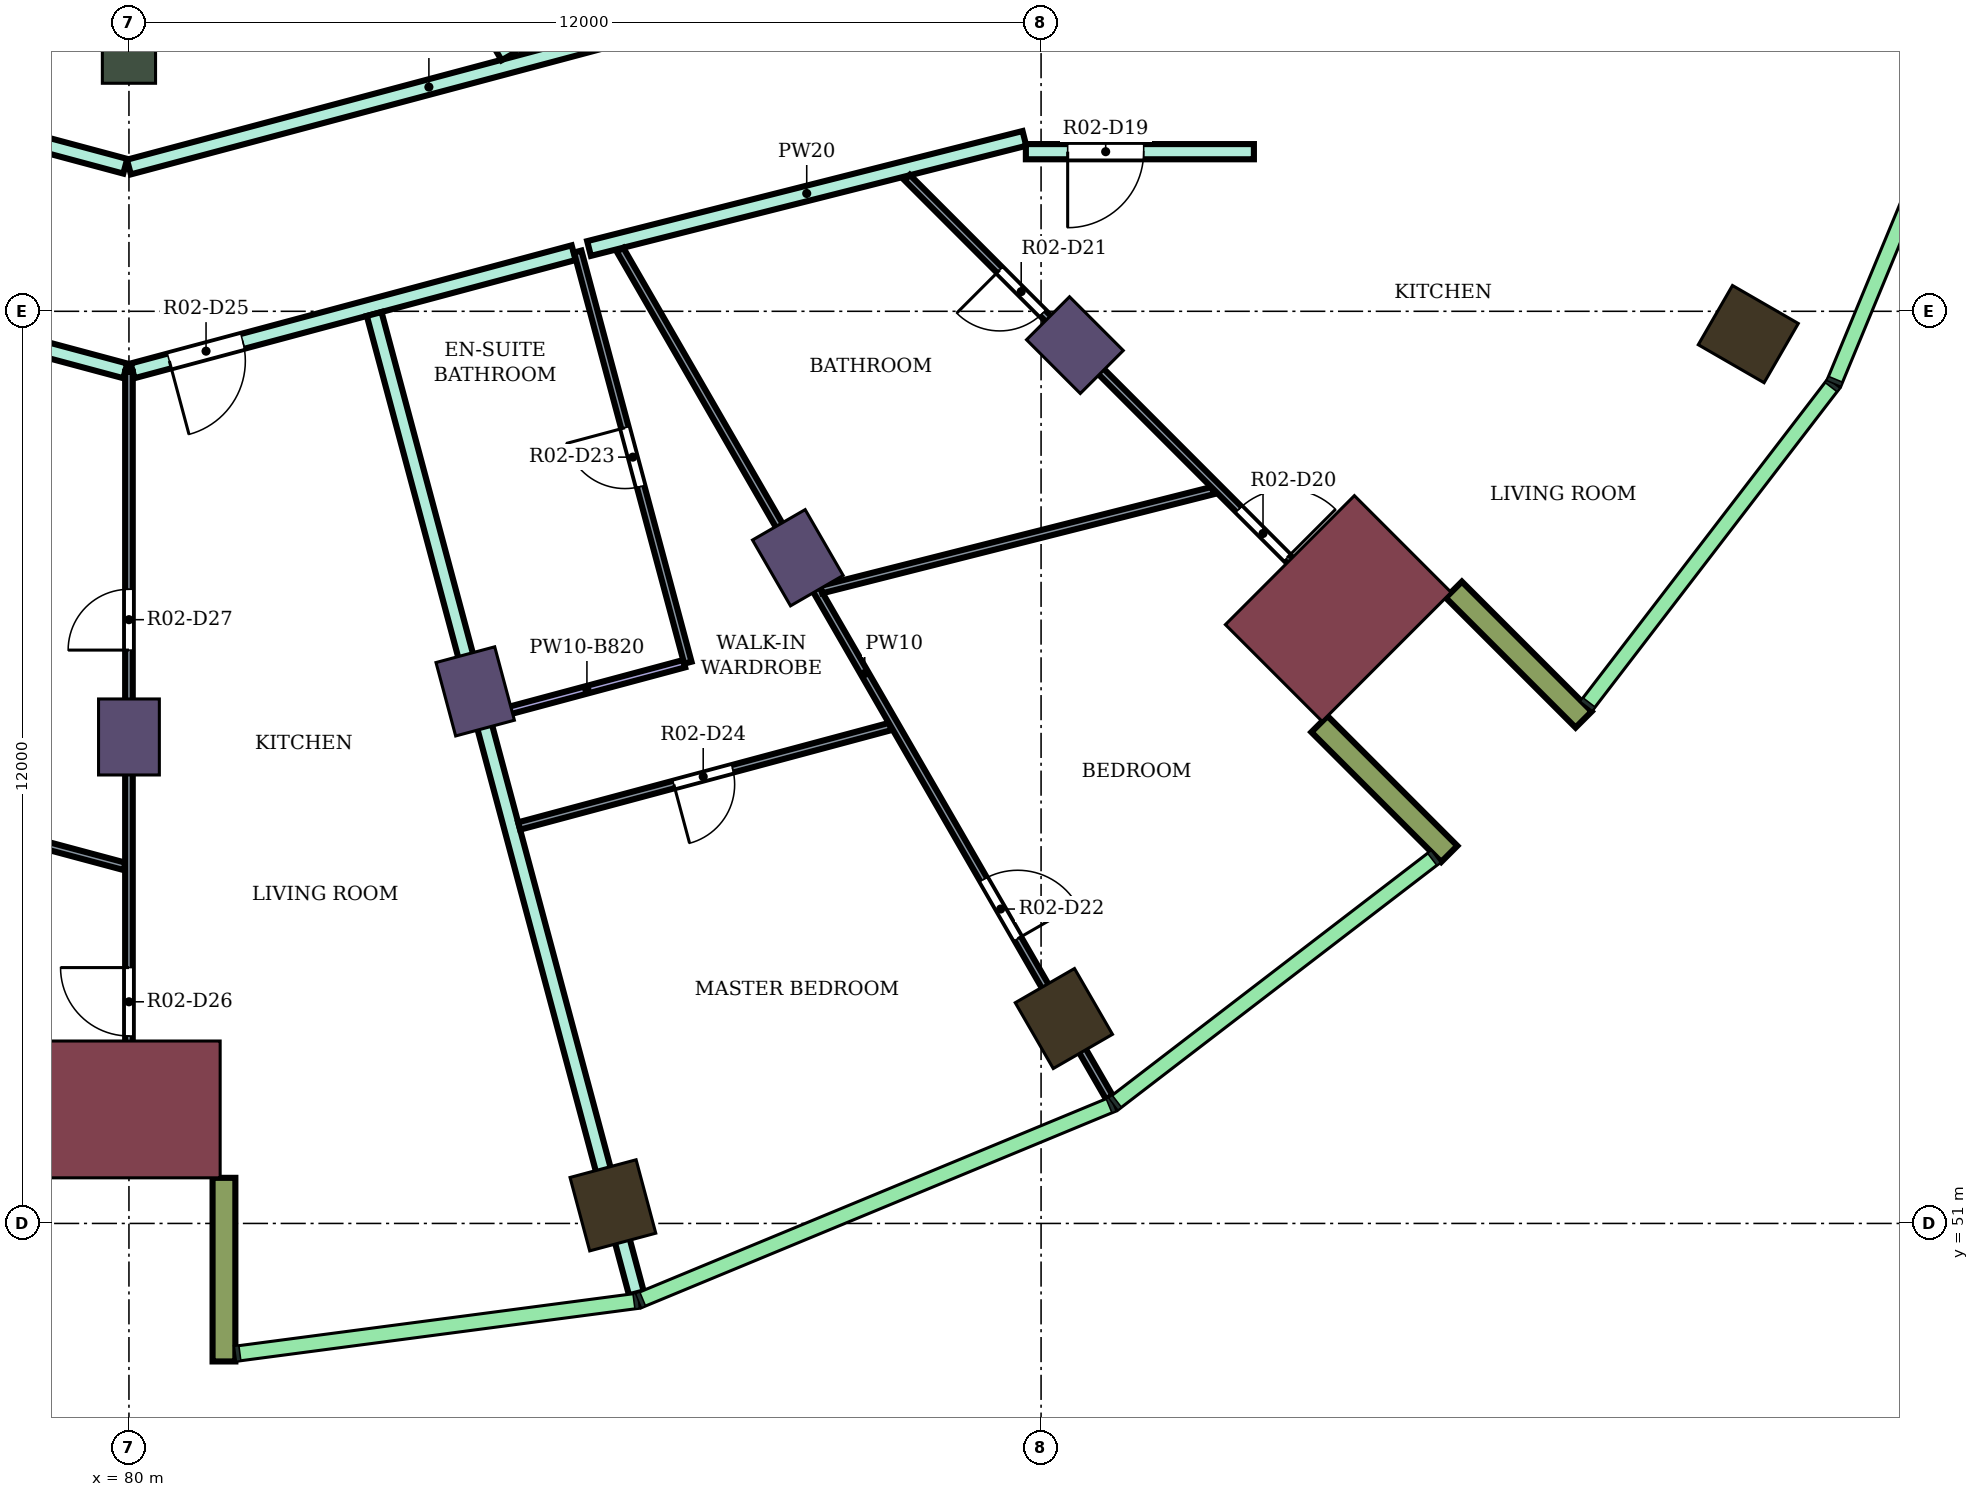
"""IFC4 building model, lengths in metres.
Left out: names, types, materials, properties, quantities, classifications, styles, units other than length and angle.
Written with IfcOpenShell. Run it as: python <this file> out.ifc"""

import sys

from ifc_helpers import new_model, si_unit, direction, frame, frame_2d, origin, origin_2d, place, context, subcontext, project, spatial, rectangle, extrude, element, fill, save


model = new_model("IFC4")
c1 = context("Model", 3, precision=1e-05, world=origin(), true_north=direction((0.0, 1.0)))
c2 = subcontext(c1, "Body", "Model", "MODEL_VIEW")
j1 = project(units=[si_unit("LENGTHUNIT", "METRE"), si_unit("PLANEANGLEUNIT", "RADIAN")], contexts=[c1])
p1 = place(None, origin())
s1 = spatial("IfcSite", under=j1, at=p1, CompositionType="ELEMENT")
p2 = place(p1, origin())
s2 = spatial("IfcBuilding", under=s1, at=p2, CompositionType="ELEMENT")
p3 = place(p2, frame((0.0, 0.0, 178.2)))
s3 = spatial("IfcBuildingStorey", under=s2, at=p3, CompositionType="ELEMENT", Elevation=178.2)
for number, where, z_axis, x_axis in (
    (1, (86.367, 51.238, 0.0), (0.0, 0.0, 1.0), (0.259, -0.966, 0.0)),
    (2, (92.3, 53.696, 0.0), (0.0, 0.0, 1.0), (0.5, -0.866, 0.0)),
    (3, (101.304, 62.7, 0.0), (0.0, 0.0, 1.0), (0.866, -0.5, 0.0)),
):
    element("IfcColumn", number, at=place(p3, frame(where, z_axis=z_axis, x_axis=x_axis)), inside=s3, PredefinedType="COLUMN", context=c2, shape_type="SweptSolid", body=[
        extrude(rectangle(XDim=1.0, YDim=0.9, at=origin_2d()), origin(), (0.0, 0.0, 1.0), 4.1),
    ])
for number, where, z_axis, x_axis in (
    (4, (80.0, 57.4, 0.0), (0.0, 0.0, 1.0), (0.0, -1.0, 0.0)),
    (5, (84.555, 58.0, 0.0), (0.0, 0.0, 1.0), (0.259, -0.966, 0.0)),
    (6, (88.8, 59.758, 0.0), (0.0, 0.0, 1.0), (0.5, -0.866, 0.0)),
    (7, (92.445, 62.555, 0.0), (0.0, 0.0, 1.0), (0.707, -0.707, 0.0)),
):
    element("IfcColumn", number, at=place(p3, frame(where, z_axis=z_axis, x_axis=x_axis)), inside=s3, PredefinedType="COLUMN", context=c2, shape_type="SweptSolid", body=[
        extrude(rectangle(XDim=1.0, YDim=0.8, at=origin_2d()), origin(), (0.0, 0.0, 1.0), 4.1),
    ])
p4 = place(p3, frame((80.0, 66.4, 0.0), z_axis=(0.0, 0.0, 1.0), x_axis=(0.0, -1.0, 0.0)))
e8 = element("IfcColumn", 8, at=p4, inside=s3, PredefinedType="COLUMN", context=c2, shape_type="SweptSolid", body=[
    extrude(rectangle(XDim=0.8, YDim=0.7, at=origin_2d()), origin(), (0.0, 0.0, 1.0), 4.1),
])
for number, where, z_axis, x_axis in (
    (9, (80.0, 52.5, 0.0), (0.0, 0.0, 1.0), (0.0, -1.0, 0.0)),
    (10, (95.91, 59.09, 0.0), (0.0, 0.0, 1.0), (0.707, -0.707, 0.0)),
):
    element("IfcColumn", number, at=place(p3, frame(where, z_axis=z_axis, x_axis=x_axis)), inside=s3, PredefinedType="COLUMN", context=c2, shape_type="SweptSolid", body=[
        extrude(rectangle(XDim=1.8, YDim=2.4, at=origin_2d()), origin(), (0.0, 0.0, 1.0), 4.1),
    ])
for number, where, z_axis, x_axis in (
    (11, (81.25, 51.6, 0.0), (0.0, 0.0, 1.0), (0.0, -1.0, 0.0)),
    (12, (95.662, 57.57, 0.0), (0.0, 0.0, 1.0), (0.707, -0.707, 0.0)),
    (13, (97.43, 59.338, 0.0), (0.0, 0.0, 1.0), (0.707, -0.707, 0.0)),
):
    element("IfcWall", number, at=place(p3, frame(where, z_axis=z_axis, x_axis=x_axis)), inside=s3, PredefinedType="NOTDEFINED", context=c2, shape_type="SweptSolid", body=[
        extrude(rectangle(XDim=2.416, YDim=0.3, at=frame_2d((1.208, 0.0))), origin(), (0.0, 0.0, 1.0), 4.1),
    ])
p5 = place(p3, frame((73.947, 63.826, 0.0), z_axis=(0.0, 0.0, 1.0), x_axis=(0.965908253407, -0.258884619088, 0.0)))
e14 = element("IfcWall", 14, at=p5, inside=s3, PredefinedType="PARTITIONING", context=c2, shape_type="SweptSolid", body=[
    extrude(rectangle(XDim=6.217, YDim=0.2, at=frame_2d((3.108, 0.0))), origin(), (0.0, 0.0, 1.0), 3.65),
])
p6 = place(p5, frame((1.424, 0.0, 0.0)))
e15 = element("IfcOpeningElement", 15, at=p6, cuts=e14, PredefinedType="OPENING", context=c2, shape_type="SweptSolid", body=[
    extrude(rectangle(XDim=1.0, YDim=2.1, at=frame_2d((0.5, 1.05))), frame((0.0, 0.11, 0.0), z_axis=(0.0, -1.0, 0.0), x_axis=(1.0, 0.0, 0.0)), (0.0, 0.0, 1.0), 0.22),
])
p7 = place(p3, frame((74.603, 66.342, 0.0), z_axis=(0.0, 0.0, 1.0), x_axis=(0.965895298152, -0.258932950796, 0.0)))
e16 = element("IfcWall", 16, at=p7, inside=s3, PredefinedType="PARTITIONING", context=c2, shape_type="SweptSolid", body=[
    extrude(rectangle(XDim=5.538, YDim=0.2, at=frame_2d((2.769, 0.0))), origin(), (0.0, 0.0, 1.0), 3.65),
])
p8 = place(p7, frame((2.062, 0.0, 0.0)))
e17 = element("IfcOpeningElement", 17, at=p8, cuts=e16, PredefinedType="OPENING", context=c2, shape_type="SweptSolid", body=[
    extrude(rectangle(XDim=1.8, YDim=2.1, at=frame_2d((0.9, 1.05))), frame((0.0, 0.11, 0.0), z_axis=(0.0, -1.0, 0.0), x_axis=(1.0, 0.0, 0.0)), (0.0, 0.0, 1.0), 0.22),
])
p9 = place(p3, frame((80.0, 64.898, 0.0), z_axis=(0.0, 0.0, 1.0), x_axis=(0.966237419782, 0.257653349704, 0.0)))
e18 = element("IfcWall", 18, at=p9, inside=s3, PredefinedType="PARTITIONING", context=c2, shape_type="SweptSolid", body=[
    extrude(rectangle(XDim=8.169, YDim=0.2, at=frame_2d((4.084, 0.0))), origin(), (0.0, 0.0, 1.0), 3.65),
])
p10 = place(p9, frame((6.428, 0.0, 0.0)))
e19 = element("IfcOpeningElement", 19, at=p10, cuts=e18, PredefinedType="OPENING", context=c2, shape_type="SweptSolid", body=[
    extrude(rectangle(XDim=0.9, YDim=2.1, at=frame_2d((0.45, 1.05))), frame((0.0, 0.11, 0.0), z_axis=(0.0, -1.0, 0.0), x_axis=(1.0, 0.0, 0.0)), (0.0, 0.0, 1.0), 0.22),
])
p11 = place(p3, frame((80.048, 62.217, 0.0), z_axis=(0.0, 0.0, 1.0), x_axis=(0.965941520544, 0.258760466242, 0.0)))
e20 = element("IfcWall", 20, at=p11, inside=s3, PredefinedType="PARTITIONING", context=c2, shape_type="SweptSolid", body=[
    extrude(rectangle(XDim=6.006, YDim=0.2, at=frame_2d((3.003, 0.0))), origin(), (0.0, 0.0, 1.0), 3.65),
])
p12 = place(p11, frame((0.5, 0.0, 0.0)))
e21 = element("IfcOpeningElement", 21, at=p12, cuts=e20, PredefinedType="OPENING", context=c2, shape_type="SweptSolid", body=[
    extrude(rectangle(XDim=1.0, YDim=2.1, at=frame_2d((0.5, 1.05))), frame((0.0, 0.11, 0.0), z_axis=(0.0, -1.0, 0.0), x_axis=(1.0, 0.0, 0.0)), (0.0, 0.0, 1.0), 0.22),
])
p13 = place(p3, frame((83.226, 62.965, 0.0), z_axis=(0.0, 0.0, 1.0), x_axis=(0.258657094602, -0.965969206244, 0.0)))
e22 = element("IfcWall", 22, at=p13, inside=s3, PredefinedType="PARTITIONING", context=c2, shape_type="SweptSolid", body=[
    extrude(rectangle(XDim=13.338, YDim=0.2, at=frame_2d((6.669, 0.0))), origin(), (0.0, 0.0, 1.0), 3.65),
])
p14 = place(p3, frame((83.847, 68.331, 0.0), z_axis=(0.0, 0.0, 1.0), x_axis=(0.499851978358, -0.866110847255, 0.0)))
e23 = element("IfcWall", 23, at=p14, inside=s3, PredefinedType="PARTITIONING", context=c2, shape_type="SweptSolid", body=[
    extrude(rectangle(XDim=2.284, YDim=0.2, at=frame_2d((1.142, 0.0))), origin(), (0.0, 0.0, 1.0), 3.65),
])
p15 = place(p3, frame((86.053, 63.826, 0.0), z_axis=(0.0, 0.0, 1.0), x_axis=(0.969490004987, 0.245130843083, 0.0)))
e24 = element("IfcWall", 24, at=p15, inside=s3, PredefinedType="PARTITIONING", context=c2, shape_type="SweptSolid", body=[
    extrude(rectangle(XDim=5.908, YDim=0.2, at=frame_2d((2.954, 0.0))), origin(), (0.0, 0.0, 1.0), 3.65),
])
p16 = place(p3, frame((91.8, 65.1, 0.0), z_axis=(0.0, 0.0, 1.0), x_axis=(1.0, 0.0, 0.0)))
e25 = element("IfcWall", 25, at=p16, inside=s3, PredefinedType="PARTITIONING", context=c2, shape_type="SweptSolid", body=[
    extrude(rectangle(XDim=3.0, YDim=0.2, at=frame_2d((1.5, 0.0))), origin(), (0.0, 0.0, 1.0), 3.65),
])
p17 = place(p16, frame((0.55, 0.0, 0.0)))
e26 = element("IfcOpeningElement", 26, at=p17, cuts=e25, PredefinedType="OPENING", context=c2, shape_type="SweptSolid", body=[
    extrude(rectangle(XDim=1.0, YDim=2.1, at=frame_2d((0.5, 1.05))), frame((0.0, 0.11, 0.0), z_axis=(0.0, -1.0, 0.0), x_axis=(1.0, 0.0, 0.0)), (0.0, 0.0, 1.0), 0.22),
])
p18 = place(p3, frame((75.267, 56.95, 0.0), z_axis=(0.0, 0.0, 1.0), x_axis=(0.965934541962, -0.258786515577, 0.0)))
e27 = element("IfcWall", 27, at=p18, inside=s3, PredefinedType="PARTITIONING", context=c2, shape_type="SweptSolid", body=[
    extrude(rectangle(XDim=4.84, YDim=0.1, at=frame_2d((2.42, 0.0))), origin(), (0.0, 0.0, 1.0), 3.65),
])
p19 = place(p3, frame((80.0, 51.8, 0.0), z_axis=(0.0, 0.0, 1.0), x_axis=(0.0, 1.0, 0.0)))
e28 = element("IfcWall", 28, at=p19, inside=s3, PredefinedType="PARTITIONING", context=c2, shape_type="SweptSolid", body=[
    extrude(rectangle(XDim=10.404, YDim=0.1, at=frame_2d((5.202, 0.0))), origin(), (0.0, 0.0, 1.0), 3.65),
])
p20 = place(p19, frame((1.666, 0.0, 0.0)))
e29 = element("IfcOpeningElement", 29, at=p20, cuts=e28, PredefinedType="OPENING", context=c2, shape_type="SweptSolid", body=[
    extrude(rectangle(XDim=0.9, YDim=2.1, at=frame_2d((0.45, 1.05))), frame((0.0, 0.06, 0.0), z_axis=(0.0, -1.0, 0.0), x_axis=(1.0, 0.0, 0.0)), (0.0, 0.0, 1.0), 0.12),
])
p21 = place(p19, frame((6.743, 0.0, 0.0)))
e30 = element("IfcOpeningElement", 30, at=p21, cuts=e28, PredefinedType="OPENING", context=c2, shape_type="SweptSolid", body=[
    extrude(rectangle(XDim=0.8, YDim=2.1, at=frame_2d((0.4, 1.05))), frame((0.0, 0.06, 0.0), z_axis=(0.0, -1.0, 0.0), x_axis=(1.0, 0.0, 0.0)), (0.0, 0.0, 1.0), 0.12),
])
p22 = place(p3, frame((84.746, 57.678, 0.0), z_axis=(0.0, 0.0, 1.0), x_axis=(0.965894568086, 0.258935674139, 0.0)))
e31 = element("IfcWall", 31, at=p22, inside=s3, PredefinedType="PARTITIONING", context=c2, shape_type="SweptSolid", body=[
    extrude(rectangle(XDim=2.649, YDim=0.1, at=frame_2d((1.325, 0.0))), origin(), (0.0, 0.0, 1.0), 3.28),
])
p23 = place(p3, frame((85.134, 56.229, 0.0), z_axis=(0.0, 0.0, 1.0), x_axis=(0.965894130068, 0.258937308051, 0.0)))
e32 = element("IfcWall", 32, at=p23, inside=s3, PredefinedType="PARTITIONING", context=c2, shape_type="SweptSolid", body=[
    extrude(rectangle(XDim=5.054, YDim=0.1, at=frame_2d((2.527, 0.0))), origin(), (0.0, 0.0, 1.0), 3.65),
])
p24 = place(p23, frame((2.107, 0.0, 0.0)))
e33 = element("IfcOpeningElement", 33, at=p24, cuts=e32, PredefinedType="OPENING", context=c2, shape_type="SweptSolid", body=[
    extrude(rectangle(XDim=0.8, YDim=2.1, at=frame_2d((0.4, 1.05))), frame((0.0, 0.06, 0.0), z_axis=(0.0, -1.0, 0.0), x_axis=(1.0, 0.0, 0.0)), (0.0, 0.0, 1.0), 0.12),
])
p25 = place(p3, frame((85.904, 63.786, 0.0), z_axis=(0.0, 0.0, 1.0), x_axis=(0.258761510459, -0.965941240814, 0.0)))
e34 = element("IfcWall", 34, at=p25, inside=s3, PredefinedType="PARTITIONING", context=c2, shape_type="SweptSolid", body=[
    extrude(rectangle(XDim=5.6, YDim=0.1, at=frame_2d((2.8, 0.0))), origin(), (0.0, 0.0, 1.0), 3.65),
])
p26 = place(p25, frame((2.4, 0.0, 0.0)))
e35 = element("IfcOpeningElement", 35, at=p26, cuts=e34, PredefinedType="OPENING", context=c2, shape_type="SweptSolid", body=[
    extrude(rectangle(XDim=0.8, YDim=2.1, at=frame_2d((0.4, 1.05))), frame((0.0, 0.06, 0.0), z_axis=(0.0, -1.0, 0.0), x_axis=(1.0, 0.0, 0.0)), (0.0, 0.0, 1.0), 0.12),
])
p27 = place(p3, frame((86.461, 63.81, 0.0), z_axis=(0.0, 0.0, 1.0), x_axis=(0.49994840431, -0.866055190521, 0.0)))
e36 = element("IfcWall", 36, at=p27, inside=s3, PredefinedType="PARTITIONING", context=c2, shape_type="SweptSolid", body=[
    extrude(rectangle(XDim=12.876, YDim=0.1, at=frame_2d((6.438, 0.0))), origin(), (0.0, 0.0, 1.0), 3.65),
])
p28 = place(p27, frame((9.565, 0.0, 0.0)))
e37 = element("IfcOpeningElement", 37, at=p28, cuts=e36, PredefinedType="OPENING", context=c2, shape_type="SweptSolid", body=[
    extrude(rectangle(XDim=0.9, YDim=2.1, at=frame_2d((0.45, 1.05))), frame((0.0, 0.06, 0.0), z_axis=(0.0, -1.0, 0.0), x_axis=(1.0, 0.0, 0.0)), (0.0, 0.0, 1.0), 0.12),
])
p29 = place(p3, frame((89.109, 59.339, 0.0), z_axis=(0.0, 0.0, 1.0), x_axis=(0.969449434389, 0.245291243552, 0.0)))
e38 = element("IfcWall", 38, at=p29, inside=s3, PredefinedType="PARTITIONING", context=c2, shape_type="SweptSolid", body=[
    extrude(rectangle(XDim=5.314, YDim=0.1, at=frame_2d((2.657, 0.0))), origin(), (0.0, 0.0, 1.0), 3.65),
])
p30 = place(p3, frame((90.238, 64.76, 0.0), z_axis=(0.0, 0.0, 1.0), x_axis=(0.707022780144, -0.707190772251, 0.0)))
e39 = element("IfcWall", 39, at=p30, inside=s3, PredefinedType="PARTITIONING", context=c2, shape_type="SweptSolid", body=[
    extrude(rectangle(XDim=8.72, YDim=0.1, at=frame_2d((4.36, 0.0))), origin(), (0.0, 0.0, 1.0), 3.65),
])
p31 = place(p30, frame((6.172, 0.0, 0.0)))
e40 = element("IfcOpeningElement", 40, at=p31, cuts=e39, PredefinedType="OPENING", context=c2, shape_type="SweptSolid", body=[
    extrude(rectangle(XDim=0.9, YDim=2.1, at=frame_2d((0.45, 1.05))), frame((0.0, 0.06, 0.0), z_axis=(0.0, -1.0, 0.0), x_axis=(1.0, 0.0, 0.0)), (0.0, 0.0, 1.0), 0.12),
])
p32 = place(p30, frame((1.722, 0.0, 0.0)))
e41 = element("IfcOpeningElement", 41, at=p32, cuts=e39, PredefinedType="OPENING", context=c2, shape_type="SweptSolid", body=[
    extrude(rectangle(XDim=0.8, YDim=2.1, at=frame_2d((0.4, 1.05))), frame((0.0, 0.06, 0.0), z_axis=(0.0, -1.0, 0.0), x_axis=(1.0, 0.0, 0.0)), (0.0, 0.0, 1.0), 0.12),
])
p33 = place(p17, frame((1.0, 0.0, 0.0), z_axis=(0.0, 0.0, 1.0), x_axis=(-1.0, 0.0, 0.0)))
e42 = element("IfcDoor", 42, at=p33, inside=s3, OperationType="SINGLE_SWING_RIGHT", PredefinedType="DOOR", context=c2, shape_type="SweptSolid", body=[
    extrude(rectangle(XDim=1.0, YDim=2.1, at=frame_2d((0.5, 1.05))), frame((0.0, 0.025, 0.0), z_axis=(0.0, -1.0, 0.0), x_axis=(1.0, 0.0, 0.0)), (0.0, 0.0, 1.0), 0.05),
])
fill(e26, e42)
p34 = place(p31, origin())
e43 = element("IfcDoor", 43, at=p34, inside=s3, OperationType="SINGLE_SWING_RIGHT", PredefinedType="DOOR", context=c2, shape_type="SweptSolid", body=[
    extrude(rectangle(XDim=0.9, YDim=2.1, at=frame_2d((0.45, 1.05))), frame((0.0, 0.025, 0.0), z_axis=(0.0, -1.0, 0.0), x_axis=(1.0, 0.0, 0.0)), (0.0, 0.0, 1.0), 0.05),
])
fill(e40, e43)
p35 = place(p32, frame((0.8, 0.0, 0.0), z_axis=(0.0, 0.0, 1.0), x_axis=(-1.0, 0.0, 0.0)))
e44 = element("IfcDoor", 44, at=p35, inside=s3, OperationType="SINGLE_SWING_RIGHT", PredefinedType="DOOR", context=c2, shape_type="SweptSolid", body=[
    extrude(rectangle(XDim=0.8, YDim=2.1, at=frame_2d((0.4, 1.05))), frame((0.0, 0.025, 0.0), z_axis=(0.0, -1.0, 0.0), x_axis=(1.0, 0.0, 0.0)), (0.0, 0.0, 1.0), 0.05),
])
fill(e41, e44)
p36 = place(p28, origin())
e45 = element("IfcDoor", 45, at=p36, inside=s3, OperationType="SINGLE_SWING_RIGHT", PredefinedType="DOOR", context=c2, shape_type="SweptSolid", body=[
    extrude(rectangle(XDim=0.9, YDim=2.1, at=frame_2d((0.45, 1.05))), frame((0.0, 0.025, 0.0), z_axis=(0.0, -1.0, 0.0), x_axis=(1.0, 0.0, 0.0)), (0.0, 0.0, 1.0), 0.05),
])
fill(e37, e45)
p37 = place(p26, frame((0.8, 0.0, 0.0), z_axis=(0.0, 0.0, 1.0), x_axis=(-1.0, 0.0, 0.0)))
e46 = element("IfcDoor", 46, at=p37, inside=s3, OperationType="SINGLE_SWING_RIGHT", PredefinedType="DOOR", context=c2, shape_type="SweptSolid", body=[
    extrude(rectangle(XDim=0.8, YDim=2.1, at=frame_2d((0.4, 1.05))), frame((0.0, 0.025, 0.0), z_axis=(0.0, -1.0, 0.0), x_axis=(1.0, 0.0, 0.0)), (0.0, 0.0, 1.0), 0.05),
])
fill(e35, e46)
p38 = place(p24, frame((0.8, 0.0, 0.0), z_axis=(0.0, 0.0, 1.0), x_axis=(-1.0, 0.0, 0.0)))
e47 = element("IfcDoor", 47, at=p38, inside=s3, OperationType="SINGLE_SWING_RIGHT", PredefinedType="DOOR", context=c2, shape_type="SweptSolid", body=[
    extrude(rectangle(XDim=0.8, YDim=2.1, at=frame_2d((0.4, 1.05))), frame((0.0, 0.025, 0.0), z_axis=(0.0, -1.0, 0.0), x_axis=(1.0, 0.0, 0.0)), (0.0, 0.0, 1.0), 0.05),
])
fill(e33, e47)
p39 = place(p12, frame((1.0, 0.0, 0.0), z_axis=(0.0, 0.0, 1.0), x_axis=(-1.0, 0.0, 0.0)))
e48 = element("IfcDoor", 48, at=p39, inside=s3, OperationType="SINGLE_SWING_RIGHT", PredefinedType="DOOR", context=c2, shape_type="SweptSolid", body=[
    extrude(rectangle(XDim=1.0, YDim=2.1, at=frame_2d((0.5, 1.05))), frame((0.0, 0.025, 0.0), z_axis=(0.0, -1.0, 0.0), x_axis=(1.0, 0.0, 0.0)), (0.0, 0.0, 1.0), 0.05),
])
fill(e21, e48)
p40 = place(p20, origin())
e49 = element("IfcDoor", 49, at=p40, inside=s3, OperationType="SINGLE_SWING_RIGHT", PredefinedType="DOOR", context=c2, shape_type="SweptSolid", body=[
    extrude(rectangle(XDim=0.9, YDim=2.1, at=frame_2d((0.45, 1.05))), frame((0.0, 0.025, 0.0), z_axis=(0.0, -1.0, 0.0), x_axis=(1.0, 0.0, 0.0)), (0.0, 0.0, 1.0), 0.05),
])
fill(e29, e49)
p41 = place(p21, origin())
e50 = element("IfcDoor", 50, at=p41, inside=s3, OperationType="SINGLE_SWING_LEFT", PredefinedType="DOOR", context=c2, shape_type="SweptSolid", body=[
    extrude(rectangle(XDim=0.8, YDim=2.1, at=frame_2d((0.4, 1.05))), frame((0.0, 0.025, 0.0), z_axis=(0.0, -1.0, 0.0), x_axis=(1.0, 0.0, 0.0)), (0.0, 0.0, 1.0), 0.05),
])
fill(e30, e50)
save(model, sys.argv[1])
